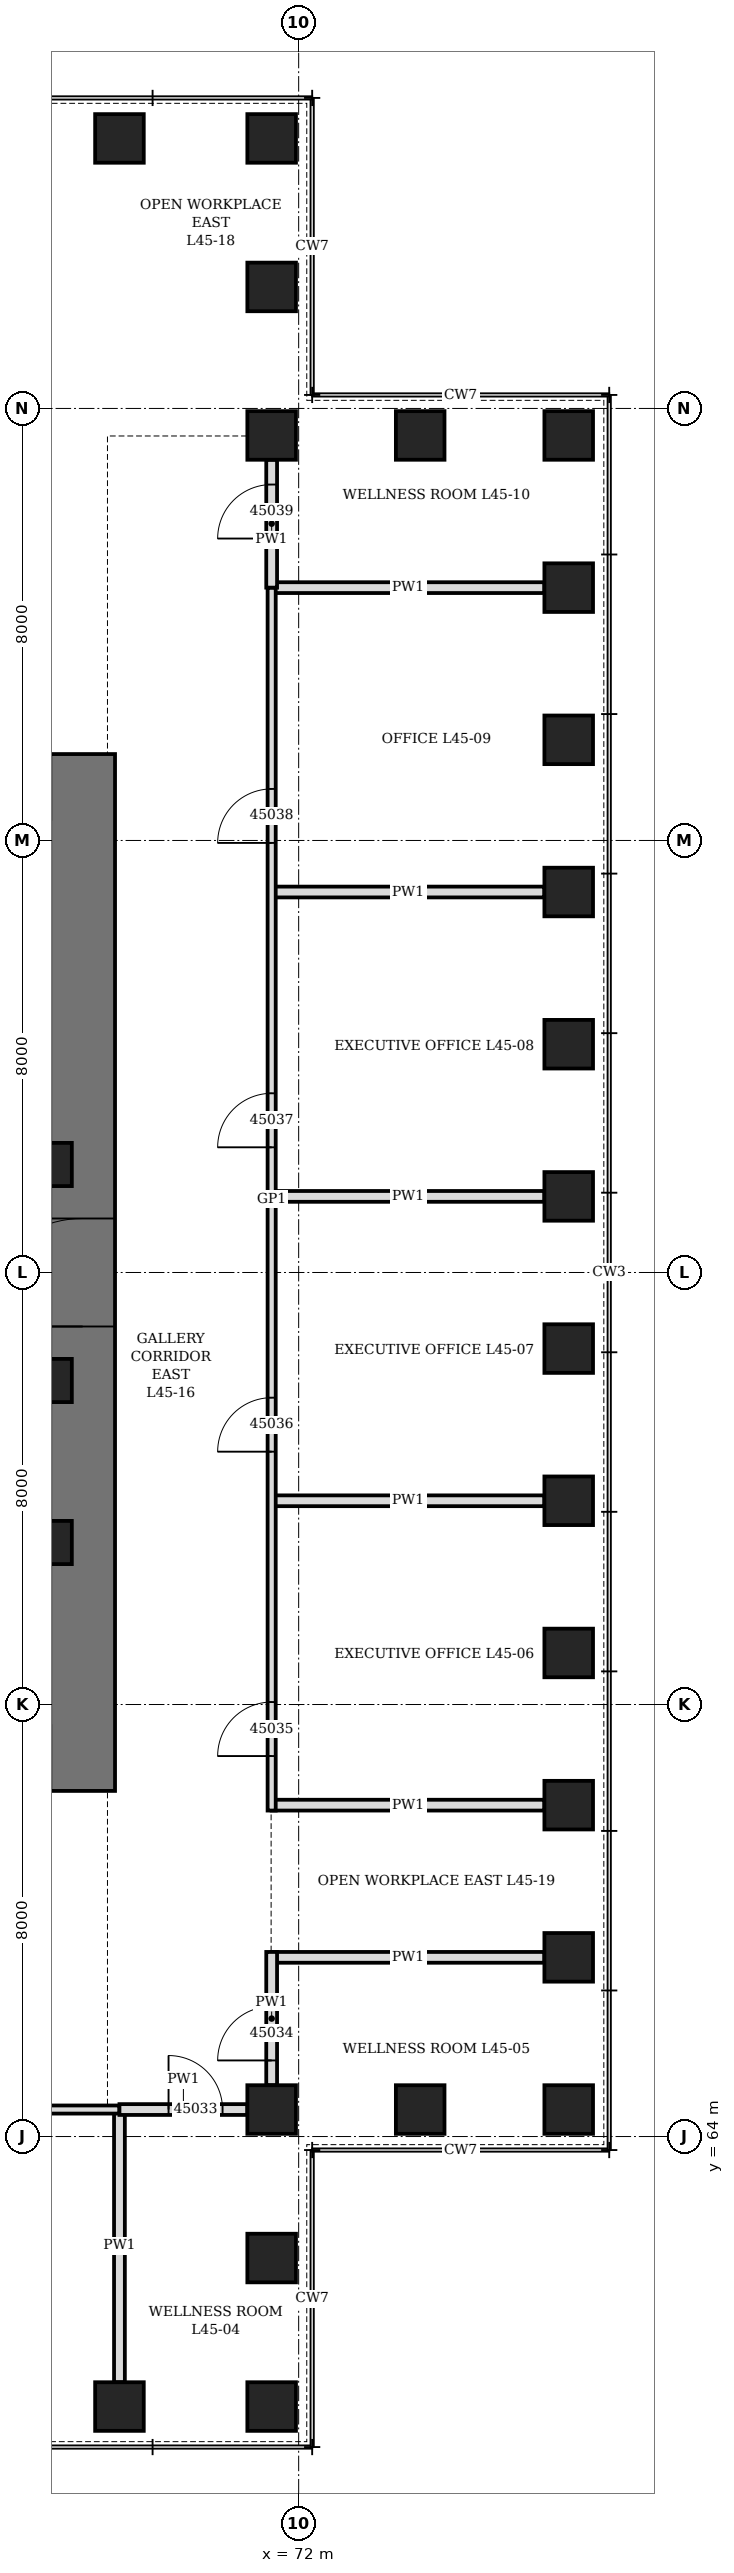
"""IFC4 building model, lengths in metres.
Left out: names, types, materials, properties, quantities, classifications, styles, units other than length and angle.
Written with IfcOpenShell. Run it as: python <this file> out.ifc"""

import sys

from ifc_helpers import new_model, si_unit, direction, frame, frame_2d, origin, origin_2d, place, context, subcontext, project, spatial, rectangle, hollow_rectangle, extrude, element, fill, save


model = new_model("IFC4")
c1 = context("Model", 3, precision=1e-05, world=origin(), true_north=direction((0.0, 1.0)))
c2 = subcontext(c1, "Body", "Model", "MODEL_VIEW")
j1 = project(units=[si_unit("LENGTHUNIT", "METRE"), si_unit("PLANEANGLEUNIT", "RADIAN")], contexts=[c1])
p1 = place(None, origin())
s1 = spatial("IfcSite", under=j1, at=p1, CompositionType="ELEMENT")
p2 = place(p1, origin())
s2 = spatial("IfcBuilding", under=s1, at=p2, CompositionType="ELEMENT")
p3 = place(p2, frame((0.0, 0.0, 202.3)))
s3 = spatial("IfcBuildingStorey", under=s2, at=p3, CompositionType="ELEMENT", Elevation=202.3)
for number, where, z_axis, x_axis in (
    (1, (68.682, 59.0, 0.0), (0.0, 0.0, 1.0), (1.0, 0.0, 0.0)),
    (2, (71.5, 59.0, 0.0), (0.0, 0.0, 1.0), (0.0, 1.0, 0.0)),
    (3, (71.5, 61.75, 0.0), (0.0, 0.0, 1.0), (0.0, 1.0, 0.0)),
    (4, (71.5, 64.5, 0.0), (0.0, 0.0, 1.0), (1.0, 0.0, 0.0)),
    (5, (74.25, 64.5, 0.0), (0.0, 0.0, 1.0), (1.0, 0.0, 0.0)),
    (6, (77.0, 64.5, 0.0), (0.0, 0.0, 1.0), (0.0, 1.0, 0.0)),
    (7, (77.0, 67.318, 0.0), (0.0, 0.0, 1.0), (0.0, 1.0, 0.0)),
    (8, (77.0, 70.136, 0.0), (0.0, 0.0, 1.0), (0.0, 1.0, 0.0)),
    (9, (77.0, 72.955, 0.0), (0.0, 0.0, 1.0), (0.0, 1.0, 0.0)),
    (10, (77.0, 75.773, 0.0), (0.0, 0.0, 1.0), (0.0, 1.0, 0.0)),
    (11, (77.0, 78.591, 0.0), (0.0, 0.0, 1.0), (0.0, 1.0, 0.0)),
    (12, (77.0, 81.409, 0.0), (0.0, 0.0, 1.0), (0.0, 1.0, 0.0)),
    (13, (77.0, 84.227, 0.0), (0.0, 0.0, 1.0), (0.0, 1.0, 0.0)),
    (14, (77.0, 87.045, 0.0), (0.0, 0.0, 1.0), (0.0, 1.0, 0.0)),
    (15, (77.0, 89.864, 0.0), (0.0, 0.0, 1.0), (0.0, 1.0, 0.0)),
    (16, (77.0, 92.682, 0.0), (0.0, 0.0, 1.0), (0.0, 1.0, 0.0)),
    (17, (77.0, 95.5, 0.0), (0.0, 0.0, 1.0), (1.0, 0.0, 0.0)),
    (18, (74.25, 95.5, 0.0), (0.0, 0.0, 1.0), (1.0, 0.0, 0.0)),
    (19, (71.5, 95.5, 0.0), (0.0, 0.0, 1.0), (0.0, 1.0, 0.0)),
    (20, (71.5, 98.25, 0.0), (0.0, 0.0, 1.0), (0.0, 1.0, 0.0)),
    (21, (71.5, 101.0, 0.0), (0.0, 0.0, 1.0), (1.0, 0.0, 0.0)),
    (22, (68.682, 101.0, 0.0), (0.0, 0.0, 1.0), (1.0, 0.0, 0.0)),
):
    element("IfcColumn", number, at=place(p3, frame(where, z_axis=z_axis, x_axis=x_axis)), inside=s3, PredefinedType="COLUMN", context=c2, shape_type="SweptSolid", body=[
        extrude(hollow_rectangle(XDim=0.9, YDim=0.9, WallThickness=0.12, at=origin_2d()), origin(), (0.0, 0.0, 1.0), 4.2),
    ])
p4 = place(p3, frame((68.0, 70.4, 0.0), z_axis=(0.0, 0.0, 1.0), x_axis=(0.0, 1.0, 0.0)))
e23 = element("IfcWall", 23, at=p4, inside=s3, PredefinedType="SHEAR", context=c2, shape_type="SweptSolid", body=[
    extrude(rectangle(XDim=19.2, YDim=1.2, at=frame_2d((9.6, 0.0))), origin(), (0.0, 0.0, 1.0), 4.2),
])
p5 = place(p4, frame((8.6, 0.0, 0.0)))
e24 = element("IfcOpeningElement", 24, at=p5, cuts=e23, PredefinedType="OPENING", context=c2, shape_type="SweptSolid", body=[
    extrude(rectangle(XDim=2.0, YDim=2.4, at=frame_2d((1.0, 1.2))), frame((0.0, 0.61, 0.0), z_axis=(0.0, -1.0, 0.0), x_axis=(1.0, 0.0, 0.0)), (0.0, 0.0, 1.0), 1.22),
])
for number, where, z_axis, x_axis in (
    (25, (67.4, 75.0, 0.0), (0.0, 0.0, 1.0), (1.0, 0.0, 0.0)),
    (26, (67.4, 78.0, 0.0), (0.0, 0.0, 1.0), (1.0, 0.0, 0.0)),
    (27, (67.4, 82.0, 0.0), (0.0, 0.0, 1.0), (1.0, 0.0, 0.0)),
):
    element("IfcColumn", number, at=place(p3, frame(where, z_axis=z_axis, x_axis=x_axis)), inside=s3, PredefinedType="COLUMN", context=c2, shape_type="SweptSolid", body=[
        extrude(hollow_rectangle(XDim=0.8, YDim=0.8, WallThickness=0.1, at=origin_2d()), origin(), (0.0, 0.0, 1.0), 4.2),
    ])
for number, where, z_axis, x_axis in (
    (28, (68.682, 59.45, 0.0), (0.0, 0.0, 1.0), (0.0, 1.0, 0.0)),
    (29, (71.5, 67.318, 0.0), (0.0, 0.0, 1.0), (1.0, 0.0, 0.0)),
    (30, (71.5, 70.136, 0.0), (0.0, 0.0, 1.0), (1.0, 0.0, 0.0)),
    (31, (71.5, 75.773, 0.0), (0.0, 0.0, 1.0), (1.0, 0.0, 0.0)),
    (32, (71.5, 81.409, 0.0), (0.0, 0.0, 1.0), (1.0, 0.0, 0.0)),
    (33, (71.5, 87.045, 0.0), (0.0, 0.0, 1.0), (1.0, 0.0, 0.0)),
    (34, (71.5, 92.682, 0.0), (0.0, 0.0, 1.0), (1.0, 0.0, 0.0)),
):
    element("IfcWall", number, at=place(p3, frame(where, z_axis=z_axis, x_axis=x_axis)), inside=s3, PredefinedType="PARTITIONING", context=c2, shape_type="SweptSolid", body=[
        extrude(rectangle(XDim=5.05, YDim=0.2, at=frame_2d((2.525, 0.0))), origin(), (0.0, 0.0, 1.0), 3.428),
    ])
p6 = place(p3, frame((62.946, 64.5, 0.0), z_axis=(0.0, 0.0, 1.0), x_axis=(1.0, 0.0, 0.0)))
e35 = element("IfcWall", 35, at=p6, inside=s3, PredefinedType="PARTITIONING", context=c2, shape_type="SweptSolid", body=[
    extrude(rectangle(XDim=5.736, YDim=0.15, at=frame_2d((2.868, 0.0))), origin(), (0.0, 0.0, 1.0), 4.04),
])
p7 = place(p6, frame((1.009, 0.0, 0.0)))
e36 = element("IfcOpeningElement", 36, at=p7, cuts=e35, PredefinedType="OPENING", context=c2, shape_type="SweptSolid", body=[
    extrude(rectangle(XDim=1.0, YDim=2.1, at=frame_2d((0.5, 1.05))), frame((0.0, 0.085, 0.0), z_axis=(0.0, -1.0, 0.0), x_axis=(1.0, 0.0, 0.0)), (0.0, 0.0, 1.0), 0.17),
])
p8 = place(p3, frame((68.682, 64.5, 0.0), z_axis=(0.0, 0.0, 1.0), x_axis=(1.0, 0.0, 0.0)))
e37 = element("IfcWall", 37, at=p8, inside=s3, PredefinedType="PARTITIONING", context=c2, shape_type="SweptSolid", body=[
    extrude(rectangle(XDim=2.368, YDim=0.2, at=frame_2d((1.184, 0.0))), origin(), (0.0, 0.0, 1.0), 4.04),
])
p9 = place(p8, frame((0.909, 0.0, 0.0)))
e38 = element("IfcOpeningElement", 38, at=p9, cuts=e37, PredefinedType="OPENING", context=c2, shape_type="SweptSolid", body=[
    extrude(rectangle(XDim=1.0, YDim=2.1, at=frame_2d((0.5, 1.05))), frame((0.0, 0.11, 0.0), z_axis=(0.0, -1.0, 0.0), x_axis=(1.0, 0.0, 0.0)), (0.0, 0.0, 1.0), 0.22),
])
p10 = place(p3, frame((71.5, 70.036, 0.0), z_axis=(0.0, 0.0, 1.0), x_axis=(0.0, 1.0, 0.0)))
e39 = element("IfcWall", 39, at=p10, inside=s3, PredefinedType="PARTITIONING", context=c2, shape_type="SweptSolid", body=[
    extrude(rectangle(XDim=22.646, YDim=0.15, at=frame_2d((11.323, 0.0))), origin(), (0.0, 0.0, 1.0), 4.04),
])
p11 = place(p10, frame((1.009, 0.0, 0.0)))
e40 = element("IfcOpeningElement", 40, at=p11, cuts=e39, PredefinedType="OPENING", context=c2, shape_type="SweptSolid", body=[
    extrude(rectangle(XDim=1.0, YDim=2.1, at=frame_2d((0.5, 1.05))), frame((0.0, 0.085, 0.0), z_axis=(0.0, -1.0, 0.0), x_axis=(1.0, 0.0, 0.0)), (0.0, 0.0, 1.0), 0.17),
])
p12 = place(p10, frame((6.646, 0.0, 0.0)))
e41 = element("IfcOpeningElement", 41, at=p12, cuts=e39, PredefinedType="OPENING", context=c2, shape_type="SweptSolid", body=[
    extrude(rectangle(XDim=1.0, YDim=2.1, at=frame_2d((0.5, 1.05))), frame((0.0, 0.085, 0.0), z_axis=(0.0, -1.0, 0.0), x_axis=(1.0, 0.0, 0.0)), (0.0, 0.0, 1.0), 0.17),
])
p13 = place(p10, frame((12.282, 0.0, 0.0)))
e42 = element("IfcOpeningElement", 42, at=p13, cuts=e39, PredefinedType="OPENING", context=c2, shape_type="SweptSolid", body=[
    extrude(rectangle(XDim=1.0, YDim=2.1, at=frame_2d((0.5, 1.05))), frame((0.0, 0.085, 0.0), z_axis=(0.0, -1.0, 0.0), x_axis=(1.0, 0.0, 0.0)), (0.0, 0.0, 1.0), 0.17),
])
p14 = place(p10, frame((17.918, 0.0, 0.0)))
e43 = element("IfcOpeningElement", 43, at=p14, cuts=e39, PredefinedType="OPENING", context=c2, shape_type="SweptSolid", body=[
    extrude(rectangle(XDim=1.0, YDim=2.1, at=frame_2d((0.5, 1.05))), frame((0.0, 0.085, 0.0), z_axis=(0.0, -1.0, 0.0), x_axis=(1.0, 0.0, 0.0)), (0.0, 0.0, 1.0), 0.17),
])
p15 = place(p3, frame((71.5, 64.95, 0.0), z_axis=(0.0, 0.0, 1.0), x_axis=(0.0, 1.0, 0.0)))
e44 = element("IfcWall", 44, at=p15, inside=s3, PredefinedType="PARTITIONING", context=c2, shape_type="SweptSolid", body=[
    extrude(rectangle(XDim=2.468, YDim=0.2, at=frame_2d((1.234, 0.0))), origin(), (0.0, 0.0, 1.0), 4.04),
])
p16 = place(p15, frame((0.459, 0.0, 0.0)))
e45 = element("IfcOpeningElement", 45, at=p16, cuts=e44, PredefinedType="OPENING", context=c2, shape_type="SweptSolid", body=[
    extrude(rectangle(XDim=1.0, YDim=2.1, at=frame_2d((0.5, 1.05))), frame((0.0, 0.11, 0.0), z_axis=(0.0, -1.0, 0.0), x_axis=(1.0, 0.0, 0.0)), (0.0, 0.0, 1.0), 0.22),
])
p17 = place(p3, frame((71.5, 92.682, 0.0), z_axis=(0.0, 0.0, 1.0), x_axis=(0.0, 1.0, 0.0)))
e46 = element("IfcWall", 46, at=p17, inside=s3, PredefinedType="PARTITIONING", context=c2, shape_type="SweptSolid", body=[
    extrude(rectangle(XDim=2.368, YDim=0.2, at=frame_2d((1.184, 0.0))), origin(), (0.0, 0.0, 1.0), 4.04),
])
p18 = place(p17, frame((0.909, 0.0, 0.0)))
e47 = element("IfcOpeningElement", 47, at=p18, cuts=e46, PredefinedType="OPENING", context=c2, shape_type="SweptSolid", body=[
    extrude(rectangle(XDim=1.0, YDim=2.1, at=frame_2d((0.5, 1.05))), frame((0.0, 0.11, 0.0), z_axis=(0.0, -1.0, 0.0), x_axis=(1.0, 0.0, 0.0)), (0.0, 0.0, 1.0), 0.22),
])
p19 = place(p5, origin())
e48 = element("IfcDoor", 48, at=p19, inside=s3, OperationType="DOUBLE_DOOR_SINGLE_SWING", PredefinedType="DOOR", context=c2, shape_type="SweptSolid", body=[
    extrude(rectangle(XDim=2.0, YDim=2.4, at=frame_2d((1.0, 1.2))), frame((0.0, 0.35, 0.0), z_axis=(0.0, -1.0, 0.0), x_axis=(1.0, 0.0, 0.0)), (0.0, 0.0, 1.0), 0.7),
])
fill(e24, e48)
p20 = place(p9, origin())
e49 = element("IfcDoor", 49, at=p20, inside=s3, OperationType="SINGLE_SWING_LEFT", PredefinedType="DOOR", context=c2, shape_type="SweptSolid", body=[
    extrude(rectangle(XDim=1.0, YDim=2.1, at=frame_2d((0.5, 1.05))), frame((0.0, 0.1, 0.0), z_axis=(0.0, -1.0, 0.0), x_axis=(1.0, 0.0, 0.0)), (0.0, 0.0, 1.0), 0.199),
])
fill(e38, e49)
p21 = place(p16, origin())
e50 = element("IfcDoor", 50, at=p21, inside=s3, OperationType="SINGLE_SWING_LEFT", PredefinedType="DOOR", context=c2, shape_type="SweptSolid", body=[
    extrude(rectangle(XDim=1.0, YDim=2.1, at=frame_2d((0.5, 1.05))), frame((0.0, 0.1, 0.0), z_axis=(0.0, -1.0, 0.0), x_axis=(1.0, 0.0, 0.0)), (0.0, 0.0, 1.0), 0.199),
])
fill(e45, e50)
p22 = place(p11, origin())
e51 = element("IfcDoor", 51, at=p22, inside=s3, OperationType="SINGLE_SWING_LEFT", PredefinedType="DOOR", context=c2, shape_type="SweptSolid", body=[
    extrude(rectangle(XDim=1.0, YDim=2.1, at=frame_2d((0.5, 1.05))), frame((0.0, 0.075, 0.0), z_axis=(0.0, -1.0, 0.0), x_axis=(1.0, 0.0, 0.0)), (0.0, 0.0, 1.0), 0.149),
])
fill(e40, e51)
p23 = place(p12, origin())
e52 = element("IfcDoor", 52, at=p23, inside=s3, OperationType="SINGLE_SWING_LEFT", PredefinedType="DOOR", context=c2, shape_type="SweptSolid", body=[
    extrude(rectangle(XDim=1.0, YDim=2.1, at=frame_2d((0.5, 1.05))), frame((0.0, 0.075, 0.0), z_axis=(0.0, -1.0, 0.0), x_axis=(1.0, 0.0, 0.0)), (0.0, 0.0, 1.0), 0.149),
])
fill(e41, e52)
p24 = place(p13, origin())
e53 = element("IfcDoor", 53, at=p24, inside=s3, OperationType="SINGLE_SWING_LEFT", PredefinedType="DOOR", context=c2, shape_type="SweptSolid", body=[
    extrude(rectangle(XDim=1.0, YDim=2.1, at=frame_2d((0.5, 1.05))), frame((0.0, 0.075, 0.0), z_axis=(0.0, -1.0, 0.0), x_axis=(1.0, 0.0, 0.0)), (0.0, 0.0, 1.0), 0.149),
])
fill(e42, e53)
p25 = place(p14, origin())
e54 = element("IfcDoor", 54, at=p25, inside=s3, OperationType="SINGLE_SWING_LEFT", PredefinedType="DOOR", context=c2, shape_type="SweptSolid", body=[
    extrude(rectangle(XDim=1.0, YDim=2.1, at=frame_2d((0.5, 1.05))), frame((0.0, 0.075, 0.0), z_axis=(0.0, -1.0, 0.0), x_axis=(1.0, 0.0, 0.0)), (0.0, 0.0, 1.0), 0.149),
])
fill(e43, e54)
p26 = place(p18, origin())
e55 = element("IfcDoor", 55, at=p26, inside=s3, OperationType="SINGLE_SWING_LEFT", PredefinedType="DOOR", context=c2, shape_type="SweptSolid", body=[
    extrude(rectangle(XDim=1.0, YDim=2.1, at=frame_2d((0.5, 1.05))), frame((0.0, 0.1, 0.0), z_axis=(0.0, -1.0, 0.0), x_axis=(1.0, 0.0, 0.0)), (0.0, 0.0, 1.0), 0.199),
])
fill(e47, e55)
save(model, sys.argv[1])
